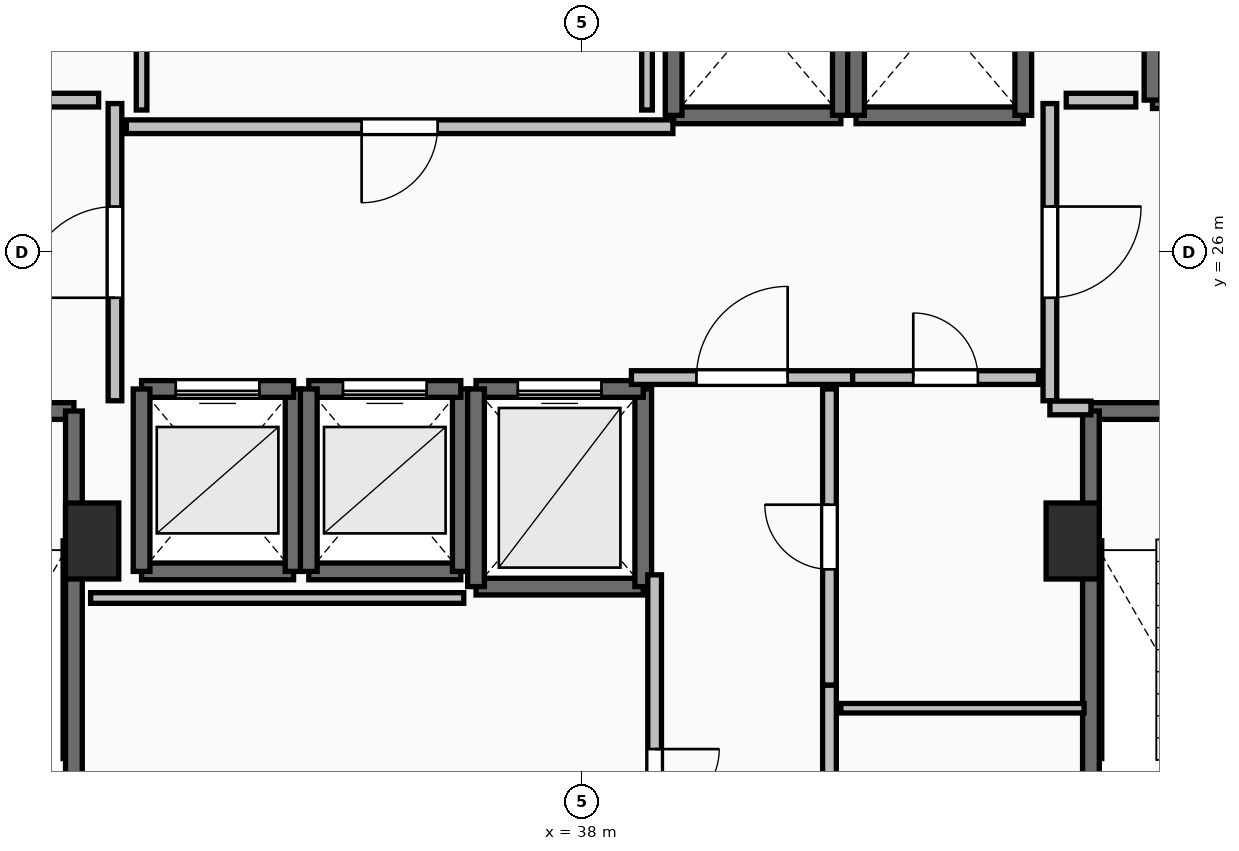
"""IFC4 building model, lengths in metres.
Left out: names, types, materials, properties, quantities, classifications, styles, units other than length and angle.
Written with IfcOpenShell. Run it as: python <this file> out.ifc"""

import sys

from ifc_helpers import new_model, si_unit, direction, frame, frame_2d, origin, origin_2d, place, context, subcontext, project, spatial, rectangle, extrude, element, fill, save


model = new_model("IFC4")
c1 = context("Model", 3, precision=1e-05, world=origin(), true_north=direction((0.0, 1.0)))
c2 = subcontext(c1, "Body", "Model", "MODEL_VIEW")
j1 = project(units=[si_unit("LENGTHUNIT", "METRE"), si_unit("PLANEANGLEUNIT", "RADIAN")], contexts=[c1])
p1 = place(None, origin())
s1 = spatial("IfcSite", under=j1, at=p1, CompositionType="ELEMENT")
p2 = place(p1, origin())
s2 = spatial("IfcBuilding", under=s1, at=p2, CompositionType="ELEMENT")
p3 = place(p2, frame((0.0, 0.0, 210.75)))
s3 = spatial("IfcBuildingStorey", under=s2, at=p3, CompositionType="ELEMENT", Elevation=210.75)
for number, where, z_axis, x_axis in (
    (1, (31.55, 22.2, 0.0), (0.0, 0.0, 1.0), (1.0, 0.0, 0.0)),
    (2, (44.45, 22.2, 0.0), (0.0, 0.0, 1.0), (1.0, 0.0, 0.0)),
):
    element("IfcColumn", number, at=place(p3, frame(where, z_axis=z_axis, x_axis=x_axis)), inside=s3, PredefinedType="PILASTER", context=c2, shape_type="SweptSolid", body=[
        extrude(rectangle(XDim=0.7, YDim=1.0, at=origin_2d()), origin(), (0.0, 0.0, 1.0), 3.55),
    ])
p4 = place(p3, frame((27.94, 23.91, 0.0), z_axis=(0.0, 0.0, 1.0), x_axis=(1.0, 0.0, 0.0)))
e3 = element("IfcWall", 3, at=p4, inside=s3, PredefinedType="SOLIDWALL", context=c2, shape_type="SweptSolid", body=[
    extrude(rectangle(XDim=3.37, YDim=0.22, at=frame_2d((1.685, 0.0))), origin(), (0.0, 0.0, 1.0), 3.29),
])
p5 = place(p4, frame((1.135, 0.0, 0.0)))
e4 = element("IfcOpeningElement", 4, at=p5, cuts=e3, PredefinedType="OPENING", context=c2, shape_type="SweptSolid", body=[
    extrude(rectangle(XDim=1.1, YDim=2.15, at=frame_2d((0.55, 1.075))), frame((0.0, 0.125, 0.0), z_axis=(0.0, -1.0, 0.0), x_axis=(1.0, 0.0, 0.0)), (0.0, 0.0, 1.0), 0.25),
])
p6 = place(p3, frame((31.31, 23.91, 0.0), z_axis=(0.0, 0.0, 1.0), x_axis=(0.0, -1.0, 0.0)))
e5 = element("IfcWall", 5, at=p6, inside=s3, PredefinedType="SOLIDWALL", context=c2, shape_type="SweptSolid", body=[
    extrude(rectangle(XDim=7.42, YDim=0.22, at=frame_2d((3.71, 0.0))), origin(), (0.0, 0.0, 1.0), 3.29),
])
p7 = place(p3, frame((44.69, 23.91, 0.0), z_axis=(0.0, 0.0, 1.0), x_axis=(1.0, 0.0, 0.0)))
e6 = element("IfcWall", 6, at=p7, inside=s3, PredefinedType="SOLIDWALL", context=c2, shape_type="SweptSolid", body=[
    extrude(rectangle(XDim=3.37, YDim=0.22, at=frame_2d((1.685, 0.0))), origin(), (0.0, 0.0, 1.0), 3.29),
])
p8 = place(p7, frame((1.135, 0.0, 0.0)))
e7 = element("IfcOpeningElement", 7, at=p8, cuts=e6, PredefinedType="OPENING", context=c2, shape_type="SweptSolid", body=[
    extrude(rectangle(XDim=1.1, YDim=2.15, at=frame_2d((0.55, 1.075))), frame((0.0, 0.125, 0.0), z_axis=(0.0, -1.0, 0.0), x_axis=(1.0, 0.0, 0.0)), (0.0, 0.0, 1.0), 0.25),
])
p9 = place(p3, frame((44.69, 16.49, 0.0), z_axis=(0.0, 0.0, 1.0), x_axis=(0.0, 1.0, 0.0)))
e8 = element("IfcWall", 8, at=p9, inside=s3, PredefinedType="SOLIDWALL", context=c2, shape_type="SweptSolid", body=[
    extrude(rectangle(XDim=7.42, YDim=0.22, at=frame_2d((3.71, 0.0))), origin(), (0.0, 0.0, 1.0), 3.29),
])
p10 = place(p3, frame((32.2, 21.8, 0.0), z_axis=(0.0, 0.0, 1.0), x_axis=(1.0, 0.0, 0.0)))
e9 = element("IfcWall", 9, at=p10, inside=s3, PredefinedType="SOLIDWALL", context=c2, shape_type="SweptSolid", body=[
    extrude(rectangle(XDim=2.0, YDim=0.22, at=frame_2d((1.0, 0.0))), origin(), (0.0, 0.0, 1.0), 3.29),
])
p11 = place(p3, frame((34.2, 21.8, 0.0), z_axis=(0.0, 0.0, 1.0), x_axis=(0.0, 1.0, 0.0)))
e10 = element("IfcWall", 10, at=p11, inside=s3, PredefinedType="SOLIDWALL", context=c2, shape_type="SweptSolid", body=[
    extrude(rectangle(XDim=2.4, YDim=0.22, at=frame_2d((1.2, 0.0))), origin(), (0.0, 0.0, 1.0), 3.29),
])
p12 = place(p3, frame((34.2, 24.2, 0.0), z_axis=(0.0, 0.0, 1.0), x_axis=(-1.0, 0.0, 0.0)))
e11 = element("IfcWall", 11, at=p12, inside=s3, PredefinedType="SOLIDWALL", context=c2, shape_type="SweptSolid", body=[
    extrude(rectangle(XDim=2.0, YDim=0.22, at=frame_2d((1.0, 0.0))), origin(), (0.0, 0.0, 1.0), 3.29),
])
p13 = place(p12, frame((0.45, 0.0, 0.0)))
e12 = element("IfcOpeningElement", 12, at=p13, cuts=e11, PredefinedType="OPENING", context=c2, shape_type="SweptSolid", body=[
    extrude(rectangle(XDim=1.1, YDim=2.2, at=frame_2d((0.55, 1.1))), frame((0.0, 0.125, 0.0), z_axis=(0.0, -1.0, 0.0), x_axis=(1.0, 0.0, 0.0)), (0.0, 0.0, 1.0), 0.25),
])
p14 = place(p3, frame((32.2, 24.2, 0.0), z_axis=(0.0, 0.0, 1.0), x_axis=(0.0, -1.0, 0.0)))
e13 = element("IfcWall", 13, at=p14, inside=s3, PredefinedType="SOLIDWALL", context=c2, shape_type="SweptSolid", body=[
    extrude(rectangle(XDim=2.4, YDim=0.22, at=frame_2d((1.2, 0.0))), origin(), (0.0, 0.0, 1.0), 3.29),
])
p15 = place(p3, frame((34.4, 21.8, 0.0), z_axis=(0.0, 0.0, 1.0), x_axis=(1.0, 0.0, 0.0)))
e14 = element("IfcWall", 14, at=p15, inside=s3, PredefinedType="SOLIDWALL", context=c2, shape_type="SweptSolid", body=[
    extrude(rectangle(XDim=2.0, YDim=0.22, at=frame_2d((1.0, 0.0))), origin(), (0.0, 0.0, 1.0), 3.29),
])
p16 = place(p3, frame((36.4, 21.8, 0.0), z_axis=(0.0, 0.0, 1.0), x_axis=(0.0, 1.0, 0.0)))
e15 = element("IfcWall", 15, at=p16, inside=s3, PredefinedType="SOLIDWALL", context=c2, shape_type="SweptSolid", body=[
    extrude(rectangle(XDim=2.4, YDim=0.22, at=frame_2d((1.2, 0.0))), origin(), (0.0, 0.0, 1.0), 3.29),
])
p17 = place(p3, frame((36.4, 24.2, 0.0), z_axis=(0.0, 0.0, 1.0), x_axis=(-1.0, 0.0, 0.0)))
e16 = element("IfcWall", 16, at=p17, inside=s3, PredefinedType="SOLIDWALL", context=c2, shape_type="SweptSolid", body=[
    extrude(rectangle(XDim=2.0, YDim=0.22, at=frame_2d((1.0, 0.0))), origin(), (0.0, 0.0, 1.0), 3.29),
])
p18 = place(p17, frame((0.45, 0.0, 0.0)))
e17 = element("IfcOpeningElement", 17, at=p18, cuts=e16, PredefinedType="OPENING", context=c2, shape_type="SweptSolid", body=[
    extrude(rectangle(XDim=1.1, YDim=2.2, at=frame_2d((0.55, 1.1))), frame((0.0, 0.125, 0.0), z_axis=(0.0, -1.0, 0.0), x_axis=(1.0, 0.0, 0.0)), (0.0, 0.0, 1.0), 0.25),
])
p19 = place(p3, frame((34.4, 24.2, 0.0), z_axis=(0.0, 0.0, 1.0), x_axis=(0.0, -1.0, 0.0)))
e18 = element("IfcWall", 18, at=p19, inside=s3, PredefinedType="SOLIDWALL", context=c2, shape_type="SweptSolid", body=[
    extrude(rectangle(XDim=2.4, YDim=0.22, at=frame_2d((1.2, 0.0))), origin(), (0.0, 0.0, 1.0), 3.29),
])
p20 = place(p3, frame((36.6, 21.6, 0.0), z_axis=(0.0, 0.0, 1.0), x_axis=(1.0, 0.0, 0.0)))
e19 = element("IfcWall", 19, at=p20, inside=s3, PredefinedType="SOLIDWALL", context=c2, shape_type="SweptSolid", body=[
    extrude(rectangle(XDim=2.2, YDim=0.22, at=frame_2d((1.1, 0.0))), origin(), (0.0, 0.0, 1.0), 3.29),
])
p21 = place(p3, frame((38.8, 21.6, 0.0), z_axis=(0.0, 0.0, 1.0), x_axis=(0.0, 1.0, 0.0)))
e20 = element("IfcWall", 20, at=p21, inside=s3, PredefinedType="SOLIDWALL", context=c2, shape_type="SweptSolid", body=[
    extrude(rectangle(XDim=2.6, YDim=0.22, at=frame_2d((1.3, 0.0))), origin(), (0.0, 0.0, 1.0), 3.29),
])
p22 = place(p3, frame((38.8, 24.2, 0.0), z_axis=(0.0, 0.0, 1.0), x_axis=(-1.0, 0.0, 0.0)))
e21 = element("IfcWall", 21, at=p22, inside=s3, PredefinedType="SOLIDWALL", context=c2, shape_type="SweptSolid", body=[
    extrude(rectangle(XDim=2.2, YDim=0.22, at=frame_2d((1.1, 0.0))), origin(), (0.0, 0.0, 1.0), 3.29),
])
p23 = place(p22, frame((0.55, 0.0, 0.0)))
e22 = element("IfcOpeningElement", 22, at=p23, cuts=e21, PredefinedType="OPENING", context=c2, shape_type="SweptSolid", body=[
    extrude(rectangle(XDim=1.1, YDim=2.2, at=frame_2d((0.55, 1.1))), frame((0.0, 0.125, 0.0), z_axis=(0.0, -1.0, 0.0), x_axis=(1.0, 0.0, 0.0)), (0.0, 0.0, 1.0), 0.25),
])
p24 = place(p3, frame((36.6, 24.2, 0.0), z_axis=(0.0, 0.0, 1.0), x_axis=(0.0, -1.0, 0.0)))
e23 = element("IfcWall", 23, at=p24, inside=s3, PredefinedType="SOLIDWALL", context=c2, shape_type="SweptSolid", body=[
    extrude(rectangle(XDim=2.6, YDim=0.22, at=frame_2d((1.3, 0.0))), origin(), (0.0, 0.0, 1.0), 3.29),
])
p25 = place(p3, frame((39.2, 27.8, 0.0), z_axis=(0.0, 0.0, 1.0), x_axis=(1.0, 0.0, 0.0)))
e24 = element("IfcWall", 24, at=p25, inside=s3, PredefinedType="SOLIDWALL", context=c2, shape_type="SweptSolid", body=[
    extrude(rectangle(XDim=2.2, YDim=0.22, at=frame_2d((1.1, 0.0))), origin(), (0.0, 0.0, 1.0), 3.29),
])
for number, where, z_axis, x_axis in (
    (25, (41.4, 27.8, 0.0), (0.0, 0.0, 1.0), (0.0, 1.0, 0.0)),
    (26, (39.2, 30.4, 0.0), (0.0, 0.0, 1.0), (0.0, -1.0, 0.0)),
):
    element("IfcWall", number, at=place(p3, frame(where, z_axis=z_axis, x_axis=x_axis)), inside=s3, PredefinedType="SOLIDWALL", context=c2, shape_type="SweptSolid", body=[
        extrude(rectangle(XDim=2.6, YDim=0.22, at=frame_2d((1.3, 0.0))), origin(), (0.0, 0.0, 1.0), 3.29),
    ])
p26 = place(p3, frame((41.6, 27.8, 0.0), z_axis=(0.0, 0.0, 1.0), x_axis=(1.0, 0.0, 0.0)))
e27 = element("IfcWall", 27, at=p26, inside=s3, PredefinedType="SOLIDWALL", context=c2, shape_type="SweptSolid", body=[
    extrude(rectangle(XDim=2.2, YDim=0.22, at=frame_2d((1.1, 0.0))), origin(), (0.0, 0.0, 1.0), 3.29),
])
for number, where, z_axis, x_axis in (
    (28, (43.8, 27.8, 0.0), (0.0, 0.0, 1.0), (0.0, 1.0, 0.0)),
    (29, (41.6, 30.4, 0.0), (0.0, 0.0, 1.0), (0.0, -1.0, 0.0)),
):
    element("IfcWall", number, at=place(p3, frame(where, z_axis=z_axis, x_axis=x_axis)), inside=s3, PredefinedType="SOLIDWALL", context=c2, shape_type="SweptSolid", body=[
        extrude(rectangle(XDim=2.6, YDim=0.22, at=frame_2d((1.3, 0.0))), origin(), (0.0, 0.0, 1.0), 3.29),
    ])
p27 = place(p3, frame((45.5, 28.0, 0.0), z_axis=(0.0, 0.0, 1.0), x_axis=(1.0, 0.0, 0.0)))
e30 = element("IfcWall", 30, at=p27, inside=s3, PredefinedType="SHEAR", context=c2, shape_type="SweptSolid", body=[
    extrude(rectangle(XDim=2.4, YDim=0.22, at=frame_2d((1.2, 0.0))), origin(), (0.0, 0.0, 1.0), 3.29),
])
p28 = place(p27, frame((0.6, 0.0, 0.0)))
e31 = element("IfcOpeningElement", 31, at=p28, cuts=e30, PredefinedType="OPENING", context=c2, shape_type="SweptSolid", body=[
    extrude(rectangle(XDim=1.2, YDim=2.2, at=frame_2d((0.6, 1.1))), frame((0.0, 0.125, 0.0), z_axis=(0.0, -1.0, 0.0), x_axis=(1.0, 0.0, 0.0)), (0.0, 0.0, 1.0), 0.25),
])
p29 = place(p3, frame((45.5, 30.5, 0.0), z_axis=(0.0, 0.0, 1.0), x_axis=(0.0, -1.0, 0.0)))
e32 = element("IfcWall", 32, at=p29, inside=s3, PredefinedType="SHEAR", context=c2, shape_type="SweptSolid", body=[
    extrude(rectangle(XDim=2.5, YDim=0.22, at=frame_2d((1.25, 0.0))), origin(), (0.0, 0.0, 1.0), 3.29),
])
p30 = place(p3, frame((31.85, 24.045, 0.0), z_axis=(0.0, 0.0, 1.0), x_axis=(0.0, 1.0, 0.0)))
e33 = element("IfcWall", 33, at=p30, inside=s3, PredefinedType="PARTITIONING", context=c2, shape_type="SweptSolid", body=[
    extrude(rectangle(XDim=3.91, YDim=0.18, at=frame_2d((1.955, 0.0))), origin(), (0.0, 0.0, 1.0), 3.29),
])
p31 = place(p30, frame((1.355, 0.0, 0.0)))
e34 = element("IfcOpeningElement", 34, at=p31, cuts=e33, PredefinedType="OPENING", context=c2, shape_type="SweptSolid", body=[
    extrude(rectangle(XDim=1.2, YDim=2.15, at=frame_2d((0.6, 1.075))), frame((0.0, 0.105, 0.0), z_axis=(0.0, -1.0, 0.0), x_axis=(1.0, 0.0, 0.0)), (0.0, 0.0, 1.0), 0.21),
])
p32 = place(p3, frame((44.15, 27.955, 0.0), z_axis=(0.0, 0.0, 1.0), x_axis=(0.0, -1.0, 0.0)))
e35 = element("IfcWall", 35, at=p32, inside=s3, PredefinedType="PARTITIONING", context=c2, shape_type="SweptSolid", body=[
    extrude(rectangle(XDim=3.91, YDim=0.18, at=frame_2d((1.955, 0.0))), origin(), (0.0, 0.0, 1.0), 3.29),
])
p33 = place(p32, frame((1.355, 0.0, 0.0)))
e36 = element("IfcOpeningElement", 36, at=p33, cuts=e35, PredefinedType="OPENING", context=c2, shape_type="SweptSolid", body=[
    extrude(rectangle(XDim=1.2, YDim=2.15, at=frame_2d((0.6, 1.075))), frame((0.0, 0.105, 0.0), z_axis=(0.0, -1.0, 0.0), x_axis=(1.0, 0.0, 0.0)), (0.0, 0.0, 1.0), 0.21),
])
p34 = place(p3, frame((44.15, 23.95, 0.0), z_axis=(0.0, 0.0, 1.0), x_axis=(1.0, 0.0, 0.0)))
e37 = element("IfcWall", 37, at=p34, inside=s3, PredefinedType="PARTITIONING", context=c2, shape_type="SweptSolid", body=[
    extrude(rectangle(XDim=0.54, YDim=0.18, at=frame_2d((0.27, 0.0))), origin(), (0.0, 0.0, 1.0), 3.29),
])
p35 = place(p3, frame((38.645, 24.35, 0.0), z_axis=(0.0, 0.0, 1.0), x_axis=(1.0, 0.0, 0.0)))
e38 = element("IfcWall", 38, at=p35, inside=s3, PredefinedType="PARTITIONING", context=c2, shape_type="SweptSolid", body=[
    extrude(rectangle(XDim=2.91, YDim=0.18, at=frame_2d((1.455, 0.0))), origin(), (0.0, 0.0, 1.0), 3.29),
])
p36 = place(p35, frame((0.855, 0.0, 0.0)))
e39 = element("IfcOpeningElement", 39, at=p36, cuts=e38, PredefinedType="OPENING", context=c2, shape_type="SweptSolid", body=[
    extrude(rectangle(XDim=1.2, YDim=2.15, at=frame_2d((0.6, 1.075))), frame((0.0, 0.105, 0.0), z_axis=(0.0, -1.0, 0.0), x_axis=(1.0, 0.0, 0.0)), (0.0, 0.0, 1.0), 0.21),
])
p37 = place(p3, frame((41.555, 24.35, 0.0), z_axis=(0.0, 0.0, 1.0), x_axis=(1.0, 0.0, 0.0)))
e40 = element("IfcWall", 40, at=p37, inside=s3, PredefinedType="PARTITIONING", context=c2, shape_type="SweptSolid", body=[
    extrude(rectangle(XDim=2.445, YDim=0.18, at=frame_2d((1.223, 0.0))), origin(), (0.0, 0.0, 1.0), 3.29),
])
p38 = place(p37, frame((0.798, 0.0, 0.0)))
e41 = element("IfcOpeningElement", 41, at=p38, cuts=e40, PredefinedType="OPENING", context=c2, shape_type="SweptSolid", body=[
    extrude(rectangle(XDim=0.85, YDim=2.1, at=frame_2d((0.425, 1.05))), frame((0.0, 0.105, 0.0), z_axis=(0.0, -1.0, 0.0), x_axis=(1.0, 0.0, 0.0)), (0.0, 0.0, 1.0), 0.21),
])
p39 = place(p3, frame((39.19, 27.65, 0.0), z_axis=(0.0, 0.0, 1.0), x_axis=(-1.0, 0.0, 0.0)))
e42 = element("IfcWall", 42, at=p39, inside=s3, PredefinedType="PARTITIONING", context=c2, shape_type="SweptSolid", body=[
    extrude(rectangle(XDim=7.19, YDim=0.18, at=frame_2d((3.595, 0.0))), origin(), (0.0, 0.0, 1.0), 3.29),
])
p40 = place(p39, frame((3.095, 0.0, 0.0)))
e43 = element("IfcOpeningElement", 43, at=p40, cuts=e42, PredefinedType="OPENING", context=c2, shape_type="SweptSolid", body=[
    extrude(rectangle(XDim=1.0, YDim=2.15, at=frame_2d((0.5, 1.075))), frame((0.0, 0.105, 0.0), z_axis=(0.0, -1.0, 0.0), x_axis=(1.0, 0.0, 0.0)), (0.0, 0.0, 1.0), 0.21),
])
p41 = place(p3, frame((41.25, 16.32, 0.0), z_axis=(0.0, 0.0, 1.0), x_axis=(0.0, 1.0, 0.0)))
e44 = element("IfcWall", 44, at=p41, inside=s3, PredefinedType="PARTITIONING", context=c2, shape_type="SweptSolid", body=[
    extrude(rectangle(XDim=3.985, YDim=0.18, at=frame_2d((1.992, 0.0))), origin(), (0.0, 0.0, 1.0), 3.29),
])
p42 = place(p41, frame((1.593, 0.0, 0.0)))
e45 = element("IfcOpeningElement", 45, at=p42, cuts=e44, PredefinedType="OPENING", context=c2, shape_type="SweptSolid", body=[
    extrude(rectangle(XDim=0.8, YDim=2.05, at=frame_2d((0.4, 1.025))), frame((0.0, 0.105, 0.0), z_axis=(0.0, -1.0, 0.0), x_axis=(1.0, 0.0, 0.0)), (0.0, 0.0, 1.0), 0.21),
])
p43 = place(p3, frame((41.25, 20.305, 0.0), z_axis=(0.0, 0.0, 1.0), x_axis=(0.0, 1.0, 0.0)))
e46 = element("IfcWall", 46, at=p43, inside=s3, PredefinedType="PARTITIONING", context=c2, shape_type="SweptSolid", body=[
    extrude(rectangle(XDim=3.895, YDim=0.18, at=frame_2d((1.948, 0.0))), origin(), (0.0, 0.0, 1.0), 3.29),
])
p44 = place(p43, frame((1.522, 0.0, 0.0)))
e47 = element("IfcOpeningElement", 47, at=p44, cuts=e46, PredefinedType="OPENING", context=c2, shape_type="SweptSolid", body=[
    extrude(rectangle(XDim=0.85, YDim=2.1, at=frame_2d((0.425, 1.05))), frame((0.0, 0.105, 0.0), z_axis=(0.0, -1.0, 0.0), x_axis=(1.0, 0.0, 0.0)), (0.0, 0.0, 1.0), 0.21),
])
p45 = place(p3, frame((38.95, 21.755, 0.0), z_axis=(0.0, 0.0, 1.0), x_axis=(0.0, -1.0, 0.0)))
e48 = element("IfcWall", 48, at=p45, inside=s3, PredefinedType="PARTITIONING", context=c2, shape_type="SweptSolid", body=[
    extrude(rectangle(XDim=5.435, YDim=0.18, at=frame_2d((2.717, 0.0))), origin(), (0.0, 0.0, 1.0), 3.29),
])
p46 = place(p45, frame((2.292, 0.0, 0.0)))
e49 = element("IfcOpeningElement", 49, at=p46, cuts=e48, PredefinedType="OPENING", context=c2, shape_type="SweptSolid", body=[
    extrude(rectangle(XDim=0.85, YDim=2.1, at=frame_2d((0.425, 1.05))), frame((0.0, 0.105, 0.0), z_axis=(0.0, -1.0, 0.0), x_axis=(1.0, 0.0, 0.0)), (0.0, 0.0, 1.0), 0.21),
])
p47 = place(p3, frame((44.6, 20.0, 0.0), z_axis=(0.0, 0.0, 1.0), x_axis=(-1.0, 0.0, 0.0)))
e50 = element("IfcWall", 50, at=p47, inside=s3, PredefinedType="PARTITIONING", context=c2, shape_type="SweptSolid", body=[
    extrude(rectangle(XDim=3.2, YDim=0.125, at=frame_2d((1.6, 0.0))), origin(), (0.0, 0.0, 1.0), 3.29),
])
for number, where, z_axis, x_axis in (
    (51, (31.635, 28.0, 0.0), (0.0, 0.0, 1.0), (-1.0, 0.0, 0.0)),
    (52, (45.28, 28.0, 0.0), (0.0, 0.0, 1.0), (-1.0, 0.0, 0.0)),
):
    element("IfcWall", number, at=place(p3, frame(where, z_axis=z_axis, x_axis=x_axis)), inside=s3, PredefinedType="PARTITIONING", context=c2, shape_type="SweptSolid", body=[
        extrude(rectangle(XDim=0.915, YDim=0.18, at=frame_2d((0.458, 0.0))), origin(), (0.0, 0.0, 1.0), 3.29),
    ])
p48 = place(p3, frame((36.439, 21.45, 0.0), z_axis=(0.0, 0.0, 1.0), x_axis=(-1.0, 0.0, 0.0)))
e53 = element("IfcWall", 53, at=p48, inside=s3, PredefinedType="PARTITIONING", context=c2, shape_type="SweptSolid", body=[
    extrude(rectangle(XDim=4.909, YDim=0.14, at=frame_2d((2.455, 0.0))), origin(), (0.0, 0.0, 1.0), 3.29),
])
for number, where, z_axis, x_axis in (
    (54, (32.2, 30.26, 0.0), (0.0, 0.0, 1.0), (0.0, -1.0, 0.0)),
    (55, (38.85, 27.87, 0.0), (0.0, 0.0, 1.0), (0.0, 1.0, 0.0)),
):
    element("IfcWall", number, at=place(p3, frame(where, z_axis=z_axis, x_axis=x_axis)), inside=s3, PredefinedType="PARTITIONING", context=c2, shape_type="SweptSolid", body=[
        extrude(rectangle(XDim=2.39, YDim=0.14, at=frame_2d((1.195, 0.0))), origin(), (0.0, 0.0, 1.0), 3.29),
    ])
p49 = place(p13, origin())
e56 = element("IfcDoor", 56, at=p49, inside=s3, OperationType="SLIDING_TO_LEFT", PredefinedType="DOOR", context=c2, shape_type="SweptSolid", body=[
    extrude(rectangle(XDim=1.1, YDim=2.2, at=frame_2d((0.55, 1.1))), frame((0.0, 0.025, 0.0), z_axis=(0.0, -1.0, 0.0), x_axis=(1.0, 0.0, 0.0)), (0.0, 0.0, 1.0), 0.05),
])
fill(e12, e56)
p50 = place(p18, origin())
e57 = element("IfcDoor", 57, at=p50, inside=s3, OperationType="SLIDING_TO_LEFT", PredefinedType="DOOR", context=c2, shape_type="SweptSolid", body=[
    extrude(rectangle(XDim=1.1, YDim=2.2, at=frame_2d((0.55, 1.1))), frame((0.0, 0.025, 0.0), z_axis=(0.0, -1.0, 0.0), x_axis=(1.0, 0.0, 0.0)), (0.0, 0.0, 1.0), 0.05),
])
fill(e17, e57)
p51 = place(p23, origin())
e58 = element("IfcDoor", 58, at=p51, inside=s3, OperationType="SLIDING_TO_LEFT", PredefinedType="DOOR", context=c2, shape_type="SweptSolid", body=[
    extrude(rectangle(XDim=1.1, YDim=2.2, at=frame_2d((0.55, 1.1))), frame((0.0, 0.025, 0.0), z_axis=(0.0, -1.0, 0.0), x_axis=(1.0, 0.0, 0.0)), (0.0, 0.0, 1.0), 0.05),
])
fill(e22, e58)
p52 = place(p31, origin())
e59 = element("IfcDoor", 59, at=p52, inside=s3, OperationType="SINGLE_SWING_LEFT", PredefinedType="DOOR", context=c2, shape_type="SweptSolid", body=[
    extrude(rectangle(XDim=1.2, YDim=2.15, at=frame_2d((0.6, 1.075))), frame((0.0, 0.025, 0.0), z_axis=(0.0, -1.0, 0.0), x_axis=(1.0, 0.0, 0.0)), (0.0, 0.0, 1.0), 0.05),
])
fill(e34, e59)
p53 = place(p33, origin())
e60 = element("IfcDoor", 60, at=p53, inside=s3, OperationType="SINGLE_SWING_LEFT", PredefinedType="DOOR", context=c2, shape_type="SweptSolid", body=[
    extrude(rectangle(XDim=1.2, YDim=2.15, at=frame_2d((0.6, 1.075))), frame((0.0, 0.025, 0.0), z_axis=(0.0, -1.0, 0.0), x_axis=(1.0, 0.0, 0.0)), (0.0, 0.0, 1.0), 0.05),
])
fill(e36, e60)
p54 = place(p36, origin())
e61 = element("IfcDoor", 61, at=p54, inside=s3, OperationType="SINGLE_SWING_RIGHT", PredefinedType="DOOR", context=c2, shape_type="SweptSolid", body=[
    extrude(rectangle(XDim=1.2, YDim=2.15, at=frame_2d((0.6, 1.075))), frame((0.0, 0.025, 0.0), z_axis=(0.0, -1.0, 0.0), x_axis=(1.0, 0.0, 0.0)), (0.0, 0.0, 1.0), 0.05),
])
fill(e39, e61)
p55 = place(p38, origin())
e62 = element("IfcDoor", 62, at=p55, inside=s3, OperationType="SINGLE_SWING_LEFT", PredefinedType="DOOR", context=c2, shape_type="SweptSolid", body=[
    extrude(rectangle(XDim=0.85, YDim=2.1, at=frame_2d((0.425, 1.05))), frame((0.0, 0.025, 0.0), z_axis=(0.0, -1.0, 0.0), x_axis=(1.0, 0.0, 0.0)), (0.0, 0.0, 1.0), 0.05),
])
fill(e41, e62)
p56 = place(p40, origin())
e63 = element("IfcDoor", 63, at=p56, inside=s3, OperationType="SINGLE_SWING_RIGHT", PredefinedType="DOOR", context=c2, shape_type="SweptSolid", body=[
    extrude(rectangle(XDim=1.0, YDim=2.15, at=frame_2d((0.5, 1.075))), frame((0.0, 0.025, 0.0), z_axis=(0.0, -1.0, 0.0), x_axis=(1.0, 0.0, 0.0)), (0.0, 0.0, 1.0), 0.05),
])
fill(e43, e63)
p57 = place(p44, origin())
e64 = element("IfcDoor", 64, at=p57, inside=s3, OperationType="SINGLE_SWING_RIGHT", PredefinedType="DOOR", context=c2, shape_type="SweptSolid", body=[
    extrude(rectangle(XDim=0.85, YDim=2.1, at=frame_2d((0.425, 1.05))), frame((0.0, 0.025, 0.0), z_axis=(0.0, -1.0, 0.0), x_axis=(1.0, 0.0, 0.0)), (0.0, 0.0, 1.0), 0.05),
])
fill(e47, e64)
p58 = place(p46, origin())
e65 = element("IfcDoor", 65, at=p58, inside=s3, OperationType="SINGLE_SWING_LEFT", PredefinedType="DOOR", context=c2, shape_type="SweptSolid", body=[
    extrude(rectangle(XDim=0.85, YDim=2.1, at=frame_2d((0.425, 1.05))), frame((0.0, 0.025, 0.0), z_axis=(0.0, -1.0, 0.0), x_axis=(1.0, 0.0, 0.0)), (0.0, 0.0, 1.0), 0.05),
])
fill(e49, e65)
save(model, sys.argv[1])
